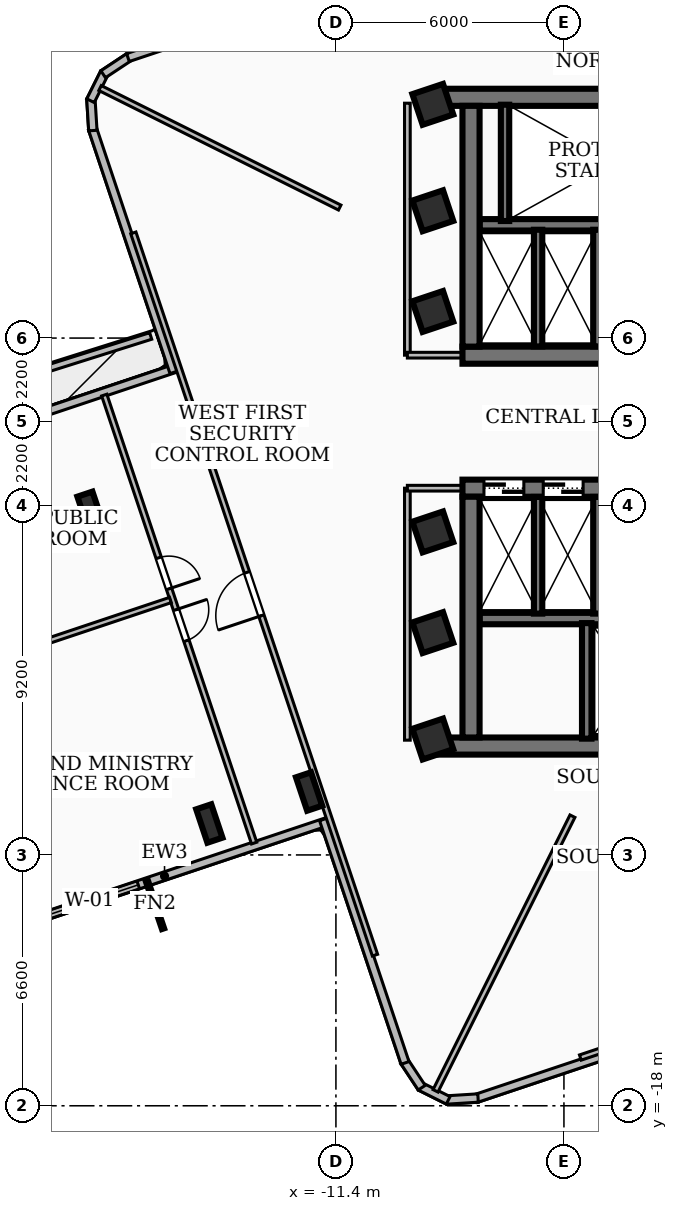
"""IFC4 building model, lengths in metres.
Left out: names, types, materials, properties, quantities, classifications, styles, units other than length and angle.
Written with IfcOpenShell. Run it as: python <this file> out.ifc"""

import sys

from ifc_helpers import new_model, si_unit, direction, frame, frame_2d, origin, origin_2d, place, context, subcontext, project, spatial, rectangle, i_section, extrude, element, fill, save


model = new_model("IFC4")
c1 = context("Model", 3, precision=1e-05, world=origin(), true_north=direction((0.0, 1.0)))
c2 = subcontext(c1, "Body", "Model", "MODEL_VIEW")
j1 = project(units=[si_unit("LENGTHUNIT", "METRE"), si_unit("PLANEANGLEUNIT", "RADIAN")], contexts=[c1])
p1 = place(None, origin())
s1 = spatial("IfcSite", under=j1, at=p1, CompositionType="ELEMENT")
p2 = place(p1, origin())
s2 = spatial("IfcBuilding", under=s1, at=p2, CompositionType="ELEMENT")
p3 = place(p2, frame((0.0, 0.0, 155.88)))
s3 = spatial("IfcBuildingStorey", under=s2, at=p3, CompositionType="ELEMENT", Elevation=155.88)
p4 = place(p3, frame((-8.78, 8.535, 0.0), z_axis=(0.0, 0.0, 1.0), x_axis=(1.0, 0.0, 0.0)))
e1 = element("IfcWall", 1, at=p4, inside=s3, PredefinedType="SHEAR", context=c2, shape_type="SweptSolid", body=[
    extrude(rectangle(XDim=17.56, YDim=0.45, at=frame_2d((8.78, 0.0))), origin(), (0.0, 0.0, 1.0), 3.34),
])
p5 = place(p3, frame((8.07, 1.75, 0.0), z_axis=(0.0, 0.0, 1.0), x_axis=(-1.0, 0.0, 0.0)))
e2 = element("IfcWall", 2, at=p5, inside=s3, PredefinedType="SHEAR", context=c2, shape_type="SweptSolid", body=[
    extrude(rectangle(XDim=16.14, YDim=0.45, at=frame_2d((8.07, 0.0))), origin(), (0.0, 0.0, 1.0), 3.34),
])
p6 = place(p5, frame((7.45, 0.0, 0.0)))
e3 = element("IfcOpeningElement", 3, at=p6, cuts=e2, PredefinedType="OPENING", context=c2, shape_type="SweptSolid", body=[
    extrude(rectangle(XDim=1.0, YDim=2.1, at=frame_2d((0.5, 1.05))), frame((0.0, 0.235, 0.0), z_axis=(0.0, -1.0, 0.0), x_axis=(1.0, 0.0, 0.0)), (0.0, 0.0, 1.0), 0.47),
])
p7 = place(p5, frame((3.4, 0.0, 0.0)))
e4 = element("IfcOpeningElement", 4, at=p7, cuts=e2, PredefinedType="OPENING", context=c2, shape_type="SweptSolid", body=[
    extrude(rectangle(XDim=0.9, YDim=2.06, at=frame_2d((0.45, 1.03))), frame((0.0, 0.235, 0.0), z_axis=(0.0, -1.0, 0.0), x_axis=(1.0, 0.0, 0.0)), (0.0, 0.0, 1.0), 0.47),
])
p8 = place(p5, frame((1.1, 0.0, 0.0)))
e5 = element("IfcOpeningElement", 5, at=p8, cuts=e2, PredefinedType="OPENING", context=c2, shape_type="SweptSolid", body=[
    extrude(rectangle(XDim=0.9, YDim=2.06, at=frame_2d((0.45, 1.03))), frame((0.0, 0.235, 0.0), z_axis=(0.0, -1.0, 0.0), x_axis=(1.0, 0.0, 0.0)), (0.0, 0.0, 1.0), 0.47),
])
p9 = place(p3, frame((-7.845, 1.975, 0.0), z_axis=(0.0, 0.0, 1.0), x_axis=(0.0, 1.0, 0.0)))
e6 = element("IfcWall", 6, at=p9, inside=s3, PredefinedType="SHEAR", context=c2, shape_type="SweptSolid", body=[
    extrude(rectangle(XDim=6.335, YDim=0.45, at=frame_2d((3.167, 0.0))), origin(), (0.0, 0.0, 1.0), 3.34),
])
p10 = place(p3, frame((7.62, 5.18, 0.0), z_axis=(0.0, 0.0, 1.0), x_axis=(-1.0, 0.0, 0.0)))
e7 = element("IfcWall", 7, at=p10, inside=s3, PredefinedType="SOLIDWALL", context=c2, shape_type="SweptSolid", body=[
    extrude(rectangle(XDim=15.24, YDim=0.3, at=frame_2d((7.62, 0.0))), origin(), (0.0, 0.0, 1.0), 3.34),
])
p11 = place(p10, frame((5.77, 0.0, 0.0)))
e8 = element("IfcOpeningElement", 8, at=p11, cuts=e7, PredefinedType="OPENING", context=c2, shape_type="SweptSolid", body=[
    extrude(rectangle(XDim=1.1, YDim=2.15, at=frame_2d((0.55, 1.075))), frame((0.0, 0.16, 0.0), z_axis=(0.0, -1.0, 0.0), x_axis=(1.0, 0.0, 0.0)), (0.0, 0.0, 1.0), 0.32),
])
p12 = place(p10, frame((2.97, 0.0, 0.0)))
e9 = element("IfcOpeningElement", 9, at=p12, cuts=e7, PredefinedType="OPENING", context=c2, shape_type="SweptSolid", body=[
    extrude(rectangle(XDim=1.1, YDim=2.15, at=frame_2d((0.55, 1.075))), frame((0.0, 0.16, 0.0), z_axis=(0.0, -1.0, 0.0), x_axis=(1.0, 0.0, 0.0)), (0.0, 0.0, 1.0), 0.32),
])
p13 = place(p10, frame((7.97, 0.0, 0.0)))
e10 = element("IfcOpeningElement", 10, at=p13, cuts=e7, PredefinedType="OPENING", context=c2, shape_type="SweptSolid", body=[
    extrude(rectangle(XDim=1.0, YDim=2.1, at=frame_2d((0.5, 1.05))), frame((0.0, 0.16, 0.0), z_axis=(0.0, -1.0, 0.0), x_axis=(1.0, 0.0, 0.0)), (0.0, 0.0, 1.0), 0.32),
])
p14 = place(p3, frame((8.78, -8.535, 0.0), z_axis=(0.0, 0.0, 1.0), x_axis=(-1.0, 0.0, 0.0)))
e11 = element("IfcWall", 11, at=p14, inside=s3, PredefinedType="SHEAR", context=c2, shape_type="SweptSolid", body=[
    extrude(rectangle(XDim=17.56, YDim=0.45, at=frame_2d((8.78, 0.0))), origin(), (0.0, 0.0, 1.0), 3.34),
])
p15 = place(p3, frame((-8.07, -1.75, 0.0), z_axis=(0.0, 0.0, 1.0), x_axis=(1.0, 0.0, 0.0)))
e12 = element("IfcWall", 12, at=p15, inside=s3, PredefinedType="SHEAR", context=c2, shape_type="SweptSolid", body=[
    extrude(rectangle(XDim=16.14, YDim=0.45, at=frame_2d((8.07, 0.0))), origin(), (0.0, 0.0, 1.0), 3.34),
])
p16 = place(p15, frame((7.45, 0.0, 0.0)))
e13 = element("IfcOpeningElement", 13, at=p16, cuts=e12, PredefinedType="OPENING", context=c2, shape_type="SweptSolid", body=[
    extrude(rectangle(XDim=1.0, YDim=2.1, at=frame_2d((0.5, 1.05))), frame((0.0, 0.235, 0.0), z_axis=(0.0, -1.0, 0.0), x_axis=(1.0, 0.0, 0.0)), (0.0, 0.0, 1.0), 0.47),
])
p17 = place(p15, frame((12.65, 0.0, 0.0)))
e14 = element("IfcOpeningElement", 14, at=p17, cuts=e12, PredefinedType="OPENING", context=c2, shape_type="SweptSolid", body=[
    extrude(rectangle(XDim=0.9, YDim=2.06, at=frame_2d((0.45, 1.03))), frame((0.0, 0.235, 0.0), z_axis=(0.0, -1.0, 0.0), x_axis=(1.0, 0.0, 0.0)), (0.0, 0.0, 1.0), 0.47),
])
p18 = place(p15, frame((0.565, 0.0, 0.0)))
e15 = element("IfcOpeningElement", 15, at=p18, cuts=e12, PredefinedType="OPENING", context=c2, shape_type="SweptSolid", body=[
    extrude(rectangle(XDim=1.05, YDim=2.15, at=frame_2d((0.525, 1.075))), frame((0.0, 0.235, 0.0), z_axis=(0.0, -1.0, 0.0), x_axis=(1.0, 0.0, 0.0)), (0.0, 0.0, 1.0), 0.47),
])
p19 = place(p15, frame((2.125, 0.0, 0.0)))
e16 = element("IfcOpeningElement", 16, at=p19, cuts=e12, PredefinedType="OPENING", context=c2, shape_type="SweptSolid", body=[
    extrude(rectangle(XDim=1.05, YDim=2.15, at=frame_2d((0.525, 1.075))), frame((0.0, 0.235, 0.0), z_axis=(0.0, -1.0, 0.0), x_axis=(1.0, 0.0, 0.0)), (0.0, 0.0, 1.0), 0.47),
])
p20 = place(p15, frame((3.685, 0.0, 0.0)))
e17 = element("IfcOpeningElement", 17, at=p20, cuts=e12, PredefinedType="OPENING", context=c2, shape_type="SweptSolid", body=[
    extrude(rectangle(XDim=1.05, YDim=2.15, at=frame_2d((0.525, 1.075))), frame((0.0, 0.235, 0.0), z_axis=(0.0, -1.0, 0.0), x_axis=(1.0, 0.0, 0.0)), (0.0, 0.0, 1.0), 0.47),
])
p21 = place(p3, frame((-7.845, -8.31, 0.0), z_axis=(0.0, 0.0, 1.0), x_axis=(0.0, 1.0, 0.0)))
e18 = element("IfcWall", 18, at=p21, inside=s3, PredefinedType="SHEAR", context=c2, shape_type="SweptSolid", body=[
    extrude(rectangle(XDim=6.335, YDim=0.45, at=frame_2d((3.167, 0.0))), origin(), (0.0, 0.0, 1.0), 3.34),
])
p22 = place(p3, frame((-7.62, -5.18, 0.0), z_axis=(0.0, 0.0, 1.0), x_axis=(1.0, 0.0, 0.0)))
e19 = element("IfcWall", 19, at=p22, inside=s3, PredefinedType="SOLIDWALL", context=c2, shape_type="SweptSolid", body=[
    extrude(rectangle(XDim=15.24, YDim=0.3, at=frame_2d((7.62, 0.0))), origin(), (0.0, 0.0, 1.0), 3.34),
])
p23 = place(p22, frame((5.77, 0.0, 0.0)))
e20 = element("IfcOpeningElement", 20, at=p23, cuts=e19, PredefinedType="OPENING", context=c2, shape_type="SweptSolid", body=[
    extrude(rectangle(XDim=1.1, YDim=2.15, at=frame_2d((0.55, 1.075))), frame((0.0, 0.16, 0.0), z_axis=(0.0, -1.0, 0.0), x_axis=(1.0, 0.0, 0.0)), (0.0, 0.0, 1.0), 0.32),
])
p24 = place(p22, frame((7.97, 0.0, 0.0)))
e21 = element("IfcOpeningElement", 21, at=p24, cuts=e19, PredefinedType="OPENING", context=c2, shape_type="SweptSolid", body=[
    extrude(rectangle(XDim=1.0, YDim=2.1, at=frame_2d((0.5, 1.05))), frame((0.0, 0.16, 0.0), z_axis=(0.0, -1.0, 0.0), x_axis=(1.0, 0.0, 0.0)), (0.0, 0.0, 1.0), 0.32),
])
p25 = place(p3, frame((-6.95, 5.28, 0.0), z_axis=(0.0, 0.0, 1.0), x_axis=(0.0, 1.0, 0.0)))
e22 = element("IfcWall", 22, at=p25, inside=s3, PredefinedType="SOLIDWALL", context=c2, shape_type="SweptSolid", body=[
    extrude(rectangle(XDim=3.06, YDim=0.22, at=frame_2d((1.53, 0.0))), origin(), (0.0, 0.0, 1.0), 3.34),
])
p26 = place(p3, frame((-4.8, -8.34, 0.0), z_axis=(0.0, 0.0, 1.0), x_axis=(0.0, 1.0, 0.0)))
e23 = element("IfcWall", 23, at=p26, inside=s3, PredefinedType="SOLIDWALL", context=c2, shape_type="SweptSolid", body=[
    extrude(rectangle(XDim=3.04, YDim=0.25, at=frame_2d((1.52, 0.0))), origin(), (0.0, 0.0, 1.0), 3.34),
])
for number, where, z_axis, x_axis in (
    (24, (-6.08, 1.98, 0.0), (0.0, 0.0, 1.0), (0.0, 1.0, 0.0)),
    (25, (-4.52, 1.98, 0.0), (0.0, 0.0, 1.0), (0.0, 1.0, 0.0)),
    (26, (-6.08, -5.05, 0.0), (0.0, 0.0, 1.0), (0.0, 1.0, 0.0)),
    (27, (-4.52, -5.05, 0.0), (0.0, 0.0, 1.0), (0.0, 1.0, 0.0)),
):
    element("IfcWall", number, at=place(p3, frame(where, z_axis=z_axis, x_axis=x_axis)), inside=s3, PredefinedType="SOLIDWALL", context=c2, shape_type="SweptSolid", body=[
        extrude(rectangle(XDim=3.07, YDim=0.22, at=frame_2d((1.535, 0.0))), origin(), (0.0, 0.0, 1.0), 3.34),
    ])
for number, where, z_axis, x_axis in (
    (28, (-8.85, -5.55, 0.0), (0.0, 0.0, 1.0), (0.948, 0.317, 0.0)),
    (29, (-8.85, -2.9, 0.0), (0.0, 0.0, 1.0), (0.948, 0.317, 0.0)),
    (30, (-8.85, 2.9, 0.0), (0.0, 0.0, 1.0), (0.948, 0.317, 0.0)),
    (31, (-8.85, 5.55, 0.0), (0.0, 0.0, 1.0), (0.948, 0.317, 0.0)),
    (32, (-8.85, 8.35, 0.0), (0.0, 0.0, 1.0), (0.948, 0.317, 0.0)),
    (33, (-8.85, -8.35, 0.0), (0.0, 0.0, 1.0), (0.948, 0.317, 0.0)),
):
    element("IfcColumn", number, at=place(p3, frame(where, z_axis=z_axis, x_axis=x_axis)), inside=s3, PredefinedType="COLUMN", context=c2, shape_type="SweptSolid", body=[
        extrude(rectangle(XDim=0.85, YDim=0.85, at=origin_2d()), origin(), (0.0, 0.0, 1.0), 3.6),
    ])
for number, where, z_axis, x_axis in (
    (34, (-17.858, -2.346, 0.0), (0.0, 0.0, 1.0), (0.948, 0.317, 0.0)),
    (35, (-12.106, -9.731, 0.0), (0.0, 0.0, 1.0), (0.948, 0.317, 0.0)),
    (36, (-14.731, -10.573, 0.0), (0.0, 0.0, 1.0), (0.948, 0.317, 0.0)),
):
    element("IfcColumn", number, at=place(p3, frame(where, z_axis=z_axis, x_axis=x_axis)), inside=s3, PredefinedType="COLUMN", context=c2, shape_type="SweptSolid", body=[
        extrude(i_section(OverallWidth=0.418, OverallDepth=0.927, WebThickness=0.019, FlangeThickness=0.032, at=origin_2d()), origin(), (0.0, 0.0, 1.0), 3.6),
    ])
p27 = place(p3, frame((-11.615, -10.519, 0.0), z_axis=(0.0, 0.0, 1.0), x_axis=(-0.948329626758, -0.317286808759, 0.0)))
e37 = element("IfcWall", 37, at=p27, inside=s3, PredefinedType="SOLIDWALL", context=c2, shape_type="SweptSolid", body=[
    extrude(rectangle(XDim=9.058, YDim=0.22, at=frame_2d((4.529, 0.0))), origin(), (0.0, 0.0, 1.0), 3.34),
])
p28 = place(p27, frame((5.258, 0.0, 0.85)))
e38 = element("IfcOpeningElement", 38, at=p28, cuts=e37, PredefinedType="OPENING", context=c2, shape_type="SweptSolid", body=[
    extrude(rectangle(XDim=2.7, YDim=2.1, at=frame_2d((1.35, 1.05))), frame((0.0, 0.12, 0.0), z_axis=(0.0, -1.0, 0.0), x_axis=(1.0, 0.0, 0.0)), (0.0, 0.0, 1.0), 0.24),
])
p29 = place(p3, frame((-24.197, -1.463, 0.0), z_axis=(0.0, 0.0, 1.0), x_axis=(0.948337736373, 0.31726256913, 0.0)))
e39 = element("IfcWall", 39, at=p29, inside=s3, PredefinedType="SOLIDWALL", context=c2, shape_type="SweptSolid", body=[
    extrude(rectangle(XDim=9.058, YDim=0.22, at=frame_2d((4.529, 0.0))), origin(), (0.0, 0.0, 1.0), 3.34),
])
p30 = place(p29, frame((1.1, 0.0, 0.85)))
e40 = element("IfcOpeningElement", 40, at=p30, cuts=e39, PredefinedType="OPENING", context=c2, shape_type="SweptSolid", body=[
    extrude(rectangle(XDim=2.7, YDim=1.65, at=frame_2d((1.35, 0.825))), frame((0.0, 0.12, 0.0), z_axis=(0.0, -1.0, 0.0), x_axis=(1.0, 0.0, 0.0)), (0.0, 0.0, 1.0), 0.24),
])
p31 = place(p3, frame((-15.662, 1.3, 0.0), z_axis=(0.0, 0.0, 1.0), x_axis=(-0.317224676093, 0.948350412494, 0.0)))
e41 = element("IfcWall", 41, at=p31, inside=s3, PredefinedType="SOLIDWALL", context=c2, shape_type="SweptSolid", body=[
    extrude(rectangle(XDim=6.758, YDim=0.22, at=frame_2d((3.379, 0.0))), origin(), (0.0, 0.0, 1.0), 3.34),
])
p32 = place(p3, frame((-17.796, 7.66, 0.0), z_axis=(0.0, 0.0, 1.0), x_axis=(-0.062305442082, 0.998057128569, 0.0)))
e42 = element("IfcWall", 42, at=p32, inside=s3, PredefinedType="SOLIDWALL", context=c2, shape_type="SweptSolid", body=[
    extrude(rectangle(XDim=0.835, YDim=0.22, at=frame_2d((0.417, 0.0))), origin(), (0.0, 0.0, 1.0), 3.34),
])
p33 = place(p3, frame((-17.857, 8.446, 0.0), z_axis=(0.0, 0.0, 1.0), x_axis=(0.446258139106, 0.894904281631, 0.0)))
e43 = element("IfcWall", 43, at=p33, inside=s3, PredefinedType="SOLIDWALL", context=c2, shape_type="SweptSolid", body=[
    extrude(rectangle(XDim=0.818, YDim=0.22, at=frame_2d((0.409, 0.0))), origin(), (0.0, 0.0, 1.0), 3.34),
])
p34 = place(p3, frame((-17.524, 9.142, 0.0), z_axis=(0.0, 0.0, 1.0), x_axis=(0.833756011094, 0.552133058206, 0.0)))
e44 = element("IfcWall", 44, at=p34, inside=s3, PredefinedType="SOLIDWALL", context=c2, shape_type="SweptSolid", body=[
    extrude(rectangle(XDim=0.835, YDim=0.22, at=frame_2d((0.417, 0.0))), origin(), (0.0, 0.0, 1.0), 3.34),
])
p35 = place(p3, frame((-16.873, 9.581, 0.0), z_axis=(0.0, 0.0, 1.0), x_axis=(0.94829606055, 0.317387116224, 0.0)))
e45 = element("IfcWall", 45, at=p35, inside=s3, PredefinedType="SOLIDWALL", context=c2, shape_type="SweptSolid", body=[
    extrude(rectangle(XDim=6.758, YDim=0.22, at=frame_2d((3.379, 0.0))), origin(), (0.0, 0.0, 1.0), 3.34),
])
p36 = place(p3, frame((-1.3, -15.662, 0.0), z_axis=(0.0, 0.0, 1.0), x_axis=(-0.948350412494, -0.317224676093, 0.0)))
e46 = element("IfcWall", 46, at=p36, inside=s3, PredefinedType="SOLIDWALL", context=c2, shape_type="SweptSolid", body=[
    extrude(rectangle(XDim=6.758, YDim=0.22, at=frame_2d((3.379, 0.0))), origin(), (0.0, 0.0, 1.0), 3.34),
])
p37 = place(p3, frame((-7.66, -17.796, 0.0), z_axis=(0.0, 0.0, 1.0), x_axis=(-0.998057128569, -0.062305442082, 0.0)))
e47 = element("IfcWall", 47, at=p37, inside=s3, PredefinedType="SOLIDWALL", context=c2, shape_type="SweptSolid", body=[
    extrude(rectangle(XDim=0.835, YDim=0.22, at=frame_2d((0.417, 0.0))), origin(), (0.0, 0.0, 1.0), 3.34),
])
p38 = place(p3, frame((-8.446, -17.857, 0.0), z_axis=(0.0, 0.0, 1.0), x_axis=(-0.894904281631, 0.446258139106, 0.0)))
e48 = element("IfcWall", 48, at=p38, inside=s3, PredefinedType="SOLIDWALL", context=c2, shape_type="SweptSolid", body=[
    extrude(rectangle(XDim=0.818, YDim=0.22, at=frame_2d((0.409, 0.0))), origin(), (0.0, 0.0, 1.0), 3.34),
])
p39 = place(p3, frame((-9.142, -17.524, 0.0), z_axis=(0.0, 0.0, 1.0), x_axis=(-0.552133058206, 0.833756011094, 0.0)))
e49 = element("IfcWall", 49, at=p39, inside=s3, PredefinedType="SOLIDWALL", context=c2, shape_type="SweptSolid", body=[
    extrude(rectangle(XDim=0.835, YDim=0.22, at=frame_2d((0.417, 0.0))), origin(), (0.0, 0.0, 1.0), 3.34),
])
p40 = place(p3, frame((-9.581, -16.873, 0.0), z_axis=(0.0, 0.0, 1.0), x_axis=(-0.317387116224, 0.94829606055, 0.0)))
e50 = element("IfcWall", 50, at=p40, inside=s3, PredefinedType="SOLIDWALL", context=c2, shape_type="SweptSolid", body=[
    extrude(rectangle(XDim=6.758, YDim=0.22, at=frame_2d((3.379, 0.0))), origin(), (0.0, 0.0, 1.0), 3.34),
])
p41 = place(p3, frame((-16.274, 2.255, 0.0), z_axis=(0.0, 0.0, 1.0), x_axis=(-0.953646241079, -0.300929970054, 0.0)))
e51 = element("IfcWall", 51, at=p41, inside=s3, PredefinedType="PARAPET", context=c2, shape_type="SweptSolid", body=[
    extrude(rectangle(XDim=12.88, YDim=0.18, at=frame_2d((6.44, 0.0))), origin(), (0.0, 0.0, 1.0), 0.88),
])
p42 = place(p3, frame((-9.52, 1.75, 0.0), z_axis=(0.0, 0.0, 1.0), x_axis=(0.0, 1.0, 0.0)))
e52 = element("IfcWall", 52, at=p42, inside=s3, PredefinedType="PARTITIONING", context=c2, shape_type="SweptSolid", body=[
    extrude(rectangle(XDim=6.63, YDim=0.15, at=frame_2d((3.315, 0.0))), origin(), (0.0, 0.0, 1.0), 3.34),
])
p43 = place(p3, frame((-7.85, 1.75, 0.0), z_axis=(0.0, 0.0, 1.0), x_axis=(-1.0, 0.0, 0.0)))
e53 = element("IfcWall", 53, at=p43, inside=s3, PredefinedType="PARTITIONING", context=c2, shape_type="SweptSolid", body=[
    extrude(rectangle(XDim=1.67, YDim=0.15, at=frame_2d((0.835, 0.0))), origin(), (0.0, 0.0, 1.0), 2.57),
])
p44 = place(p3, frame((-9.52, -8.38, 0.0), z_axis=(0.0, 0.0, 1.0), x_axis=(0.0, 1.0, 0.0)))
e54 = element("IfcWall", 54, at=p44, inside=s3, PredefinedType="PARTITIONING", context=c2, shape_type="SweptSolid", body=[
    extrude(rectangle(XDim=6.63, YDim=0.15, at=frame_2d((3.315, 0.0))), origin(), (0.0, 0.0, 1.0), 2.644),
])
p45 = place(p3, frame((-7.85, -1.75, 0.0), z_axis=(0.0, 0.0, 1.0), x_axis=(-1.0, 0.0, 0.0)))
e55 = element("IfcWall", 55, at=p45, inside=s3, PredefinedType="PARTITIONING", context=c2, shape_type="SweptSolid", body=[
    extrude(rectangle(XDim=1.67, YDim=0.15, at=frame_2d((0.835, 0.0))), origin(), (0.0, 0.0, 1.0), 2.57),
])
p46 = place(p3, frame((-11.3, 5.634, 0.0), z_axis=(0.0, 0.0, 1.0), x_axis=(-0.894904738475, 0.446257222972, 0.0)))
e56 = element("IfcWall", 56, at=p46, inside=s3, PredefinedType="PARTITIONING", context=c2, shape_type="SweptSolid", body=[
    extrude(rectangle(XDim=7.048, YDim=0.145, at=frame_2d((3.524, 0.0))), origin(), (0.0, 0.0, 1.0), 3.34),
])
p47 = place(p3, frame((-5.176, -10.38, 0.0), z_axis=(0.0, 0.0, 1.0), x_axis=(-0.446173290391, -0.894946587759, 0.0)))
e57 = element("IfcWall", 57, at=p47, inside=s3, PredefinedType="PARTITIONING", context=c2, shape_type="SweptSolid", body=[
    extrude(rectangle(XDim=8.075, YDim=0.145, at=frame_2d((4.038, 0.0))), origin(), (0.0, 0.0, 1.0), 3.34),
])
p48 = place(p3, frame((-10.372, -14.037, 0.0), z_axis=(0.0, 0.0, 1.0), x_axis=(-0.317298382655, 0.94832575435, 0.0)))
e58 = element("IfcWall", 58, at=p48, inside=s3, PredefinedType="PARTITIONING", context=c2, shape_type="SweptSolid", body=[
    extrude(rectangle(XDim=20.041, YDim=0.145, at=frame_2d((10.021, 0.0))), origin(), (0.0, 0.0, 1.0), 2.644),
])
p49 = place(p48, frame((9.42, 0.0, 0.0)))
e59 = element("IfcOpeningElement", 59, at=p49, cuts=e58, PredefinedType="OPENING", context=c2, shape_type="SweptSolid", body=[
    extrude(rectangle(XDim=1.2, YDim=2.1, at=frame_2d((0.6, 1.05))), frame((0.0, 0.083, 0.0), z_axis=(0.0, -1.0, 0.0), x_axis=(1.0, 0.0, 0.0)), (0.0, 0.0, 1.0), 0.165),
])
p50 = place(p3, frame((-15.755, -4.692, 0.0), z_axis=(0.0, 0.0, 1.0), x_axis=(-0.948309976651, -0.31734553437, 0.0)))
e60 = element("IfcWall", 60, at=p50, inside=s3, PredefinedType="PARTITIONING", context=c2, shape_type="SweptSolid", body=[
    extrude(rectangle(XDim=8.385, YDim=0.145, at=frame_2d((4.193, 0.0))), origin(), (0.0, 0.0, 1.0), 2.793),
])
p51 = place(p3, frame((-17.496, 0.7, 0.0), z_axis=(0.0, 0.0, 1.0), x_axis=(0.317299961245, -0.948325226172, 0.0)))
e61 = element("IfcWall", 61, at=p51, inside=s3, PredefinedType="PARTITIONING", context=c2, shape_type="SweptSolid", body=[
    extrude(rectangle(XDim=12.43, YDim=0.145, at=frame_2d((6.215, 0.0))), origin(), (0.0, 0.0, 1.0), 2.644),
])
p52 = place(p51, frame((4.515, 0.0, 0.0)))
e62 = element("IfcOpeningElement", 62, at=p52, cuts=e61, PredefinedType="OPENING", context=c2, shape_type="SweptSolid", body=[
    extrude(rectangle(XDim=0.86, YDim=2.04, at=frame_2d((0.43, 1.02))), frame((0.0, 0.083, 0.0), z_axis=(0.0, -1.0, 0.0), x_axis=(1.0, 0.0, 0.0)), (0.0, 0.0, 1.0), 0.165),
])
p53 = place(p51, frame((5.955, 0.0, 0.0)))
e63 = element("IfcOpeningElement", 63, at=p53, cuts=e61, PredefinedType="OPENING", context=c2, shape_type="SweptSolid", body=[
    extrude(rectangle(XDim=0.86, YDim=2.04, at=frame_2d((0.43, 1.02))), frame((0.0, 0.083, 0.0), z_axis=(0.0, -1.0, 0.0), x_axis=(1.0, 0.0, 0.0)), (0.0, 0.0, 1.0), 0.165),
])
p54 = place(p3, frame((14.037, -10.372, 0.0), z_axis=(0.0, 0.0, 1.0), x_axis=(-0.94832575435, -0.317298382655, 0.0)))
e64 = element("IfcWall", 64, at=p54, inside=s3, PredefinedType="PARTITIONING", context=c2, shape_type="SweptSolid", body=[
    extrude(rectangle(XDim=20.041, YDim=0.145, at=frame_2d((10.021, 0.0))), origin(), (0.0, 0.0, 1.0), 2.644),
])
p55 = place(p54, frame((9.42, 0.0, 0.0)))
e65 = element("IfcOpeningElement", 65, at=p55, cuts=e64, PredefinedType="OPENING", context=c2, shape_type="SweptSolid", body=[
    extrude(rectangle(XDim=1.2, YDim=2.1, at=frame_2d((0.6, 1.05))), frame((0.0, 0.083, 0.0), z_axis=(0.0, -1.0, 0.0), x_axis=(1.0, 0.0, 0.0)), (0.0, 0.0, 1.0), 0.165),
])
p56 = place(p28, origin())
e66 = element("IfcWindow", 66, at=p56, inside=s3, PartitioningType="SINGLE_PANEL", PredefinedType="WINDOW", context=c2, shape_type="SweptSolid", body=[
    extrude(rectangle(XDim=2.7, YDim=2.1, at=frame_2d((1.35, 1.05))), frame((0.0, 0.03, 0.0), z_axis=(0.0, -1.0, 0.0), x_axis=(1.0, 0.0, 0.0)), (0.0, 0.0, 1.0), 0.06),
])
fill(e38, e66)
p57 = place(p18, origin())
e67 = element("IfcDoor", 67, at=p57, inside=s3, OperationType="DOUBLE_DOOR_SLIDING", PredefinedType="DOOR", context=c2, shape_type="SweptSolid", body=[
    extrude(rectangle(XDim=1.05, YDim=2.15, at=frame_2d((0.525, 1.075))), frame((0.0, 0.025, 0.0), z_axis=(0.0, -1.0, 0.0), x_axis=(1.0, 0.0, 0.0)), (0.0, 0.0, 1.0), 0.05),
])
fill(e15, e67)
p58 = place(p19, origin())
e68 = element("IfcDoor", 68, at=p58, inside=s3, OperationType="DOUBLE_DOOR_SLIDING", PredefinedType="DOOR", context=c2, shape_type="SweptSolid", body=[
    extrude(rectangle(XDim=1.05, YDim=2.15, at=frame_2d((0.525, 1.075))), frame((0.0, 0.025, 0.0), z_axis=(0.0, -1.0, 0.0), x_axis=(1.0, 0.0, 0.0)), (0.0, 0.0, 1.0), 0.05),
])
fill(e16, e68)
p59 = place(p49, origin())
e69 = element("IfcDoor", 69, at=p59, inside=s3, OperationType="SINGLE_SWING_LEFT", PredefinedType="DOOR", context=c2, shape_type="SweptSolid", body=[
    extrude(rectangle(XDim=1.2, YDim=2.1, at=frame_2d((0.6, 1.05))), frame((0.0, 0.025, 0.0), z_axis=(0.0, -1.0, 0.0), x_axis=(1.0, 0.0, 0.0)), (0.0, 0.0, 1.0), 0.05),
])
fill(e59, e69)
p60 = place(p52, origin())
e70 = element("IfcDoor", 70, at=p60, inside=s3, OperationType="SINGLE_SWING_RIGHT", PredefinedType="DOOR", context=c2, shape_type="SweptSolid", body=[
    extrude(rectangle(XDim=0.86, YDim=2.04, at=frame_2d((0.43, 1.02))), frame((0.0, 0.025, 0.0), z_axis=(0.0, -1.0, 0.0), x_axis=(1.0, 0.0, 0.0)), (0.0, 0.0, 1.0), 0.05),
])
fill(e62, e70)
p61 = place(p53, origin())
e71 = element("IfcDoor", 71, at=p61, inside=s3, OperationType="SINGLE_SWING_LEFT", PredefinedType="DOOR", context=c2, shape_type="SweptSolid", body=[
    extrude(rectangle(XDim=0.86, YDim=2.04, at=frame_2d((0.43, 1.02))), frame((0.0, 0.025, 0.0), z_axis=(0.0, -1.0, 0.0), x_axis=(1.0, 0.0, 0.0)), (0.0, 0.0, 1.0), 0.05),
])
fill(e63, e71)
save(model, sys.argv[1])
